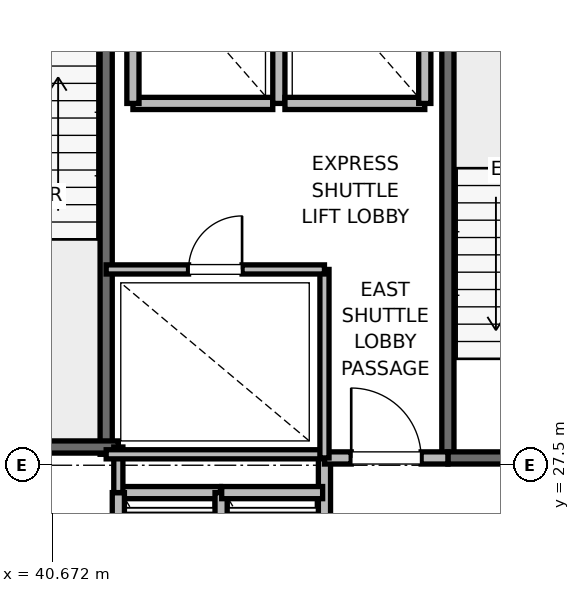
"""IFC4 building model, lengths in metres.
Left out: names, types, materials, properties, quantities, classifications, styles, units other than length and angle.
Written with IfcOpenShell. Run it as: python <this file> out.ifc"""

import sys

from ifc_helpers import new_model, si_unit, direction, frame, frame_2d, origin, place, context, subcontext, project, spatial, rectangle, extrude, element, fill, save


model = new_model("IFC4")
c1 = context("Model", 3, precision=1e-05, world=origin(), true_north=direction((0.0, 1.0)))
c2 = subcontext(c1, "Body", "Model", "MODEL_VIEW")
j1 = project(units=[si_unit("LENGTHUNIT", "METRE"), si_unit("PLANEANGLEUNIT", "RADIAN")], contexts=[c1])
p1 = place(None, origin())
s1 = spatial("IfcSite", under=j1, at=p1, CompositionType="ELEMENT")
p2 = place(p1, origin())
s2 = spatial("IfcBuilding", under=s1, at=p2, CompositionType="ELEMENT")
p3 = place(p2, frame((0.0, 0.0, 225.2)))
s3 = spatial("IfcBuildingStorey", under=s2, at=p3, CompositionType="ELEMENT", Elevation=225.2)
p4 = place(p3, frame((47.18, 27.62, 0.0), z_axis=(0.0, 0.0, 1.0), x_axis=(0.0, 1.0, 0.0)))
e1 = element("IfcWall", 1, at=p4, inside=s3, PredefinedType="SOLIDWALL", context=c2, shape_type="SweptSolid", body=[
    extrude(rectangle(XDim=8.18, YDim=0.2, at=frame_2d((4.09, 0.0))), origin(), (0.0, 0.0, 1.0), 3.775),
])
p5 = place(p3, frame((47.18, 27.62, 0.0), z_axis=(0.0, 0.0, 1.0), x_axis=(1.0, 0.0, 0.0)))
e2 = element("IfcWall", 2, at=p5, inside=s3, PredefinedType="SOLIDWALL", context=c2, shape_type="SweptSolid", body=[
    extrude(rectangle(XDim=3.12, YDim=0.2, at=frame_2d((1.56, 0.0))), origin(), (0.0, 0.0, 1.0), 3.775),
])
p6 = place(p5, frame((1.01, 0.0, 0.0)))
e3 = element("IfcOpeningElement", 3, at=p6, cuts=e2, PredefinedType="OPENING", context=c2, shape_type="SweptSolid", body=[
    extrude(rectangle(XDim=1.1, YDim=2.15, at=frame_2d((0.55, 1.075))), frame((0.0, 0.1, 0.0), z_axis=(0.0, -1.0, 0.0), x_axis=(1.0, 0.0, 0.0)), (0.0, 0.0, 1.0), 0.2),
])
p7 = place(p3, frame((41.56, 27.68, 0.0), z_axis=(0.0, 0.0, 1.0), x_axis=(0.0, 1.0, 0.0)))
e4 = element("IfcWall", 4, at=p7, inside=s3, PredefinedType="SOLIDWALL", context=c2, shape_type="SweptSolid", body=[
    extrude(rectangle(XDim=8.57, YDim=0.2, at=frame_2d((4.285, 0.0))), origin(), (0.0, 0.0, 1.0), 3.775),
])
p8 = place(p3, frame((38.44, 27.8, 0.0), z_axis=(0.0, 0.0, 1.0), x_axis=(1.0, 0.0, 0.0)))
e5 = element("IfcWall", 5, at=p8, inside=s3, PredefinedType="SOLIDWALL", context=c2, shape_type="SweptSolid", body=[
    extrude(rectangle(XDim=3.32, YDim=0.2, at=frame_2d((1.66, 0.0))), origin(), (0.0, 0.0, 1.0), 3.775),
])
p9 = place(p3, frame((45.15, 24.25, 0.0), z_axis=(0.0, 0.0, 1.0), x_axis=(0.0, 1.0, 0.0)))
e6 = element("IfcWall", 6, at=p9, inside=s3, PredefinedType="PARTITIONING", context=c2, shape_type="SweptSolid", body=[
    extrude(rectangle(XDim=3.37, YDim=0.2, at=frame_2d((1.685, 0.0))), origin(), (0.0, 0.0, 1.0), 3.775),
])
p10 = place(p3, frame((45.15, 27.62, 0.0), z_axis=(0.0, 0.0, 1.0), x_axis=(1.0, 0.0, 0.0)))
e7 = element("IfcWall", 7, at=p10, inside=s3, PredefinedType="PARTITIONING", context=c2, shape_type="SweptSolid", body=[
    extrude(rectangle(XDim=2.03, YDim=0.2, at=frame_2d((1.015, 0.0))), origin(), (0.0, 0.0, 1.0), 3.775),
])
p11 = place(p10, frame((0.44, 0.0, 0.0)))
e8 = element("IfcOpeningElement", 8, at=p11, cuts=e7, PredefinedType="OPENING", context=c2, shape_type="SweptSolid", body=[
    extrude(rectangle(XDim=1.15, YDim=2.2, at=frame_2d((0.575, 1.1))), frame((0.0, 0.1, 0.0), z_axis=(0.0, -1.0, 0.0), x_axis=(1.0, 0.0, 0.0)), (0.0, 0.0, 1.0), 0.2),
])
p12 = place(p3, frame((43.44, 27.05, 0.0), z_axis=(0.0, 0.0, 1.0), x_axis=(-1.0, 0.0, 0.0)))
e9 = element("IfcWall", 9, at=p12, inside=s3, PredefinedType="SOLIDWALL", context=c2, shape_type="SweptSolid", body=[
    extrude(rectangle(XDim=1.68, YDim=0.2, at=frame_2d((0.84, 0.0))), origin(), (0.0, 0.0, 1.0), 3.775),
])
for number, where, z_axis, x_axis in (
    (10, (41.76, 27.05, 0.0), (0.0, 0.0, 1.0), (0.0, -1.0, 0.0)),
    (11, (43.45, 24.45, 0.0), (0.0, 0.0, 1.0), (0.0, 1.0, 0.0)),
):
    element("IfcWall", number, at=place(p3, frame(where, z_axis=z_axis, x_axis=x_axis)), inside=s3, PredefinedType="SOLIDWALL", context=c2, shape_type="SweptSolid", body=[
        extrude(rectangle(XDim=2.6, YDim=0.2, at=frame_2d((1.3, 0.0))), origin(), (0.0, 0.0, 1.0), 3.775),
    ])
p13 = place(p3, frame((45.12, 27.05, 0.0), z_axis=(0.0, 0.0, 1.0), x_axis=(-1.0, 0.0, 0.0)))
e12 = element("IfcWall", 12, at=p13, inside=s3, PredefinedType="SOLIDWALL", context=c2, shape_type="SweptSolid", body=[
    extrude(rectangle(XDim=1.66, YDim=0.2, at=frame_2d((0.83, 0.0))), origin(), (0.0, 0.0, 1.0), 3.775),
])
p14 = place(p3, frame((42.0, 33.45, 0.0), z_axis=(0.0, 0.0, 1.0), x_axis=(1.0, 0.0, 0.0)))
e13 = element("IfcWall", 13, at=p14, inside=s3, PredefinedType="SOLIDWALL", context=c2, shape_type="SweptSolid", body=[
    extrude(rectangle(XDim=2.3, YDim=0.2, at=frame_2d((1.15, 0.0))), origin(), (0.0, 0.0, 1.0), 3.775),
])
for number, where, z_axis, x_axis in (
    (14, (42.0, 36.05, 0.0), (0.0, 0.0, 1.0), (0.0, -1.0, 0.0)),
    (15, (44.4, 33.45, 0.0), (0.0, 0.0, 1.0), (0.0, 1.0, 0.0)),
):
    element("IfcWall", number, at=place(p3, frame(where, z_axis=z_axis, x_axis=x_axis)), inside=s3, PredefinedType="SOLIDWALL", context=c2, shape_type="SweptSolid", body=[
        extrude(rectangle(XDim=2.6, YDim=0.2, at=frame_2d((1.3, 0.0))), origin(), (0.0, 0.0, 1.0), 2.755),
    ])
p15 = place(p3, frame((44.5, 33.45, 0.0), z_axis=(0.0, 0.0, 1.0), x_axis=(1.0, 0.0, 0.0)))
e16 = element("IfcWall", 16, at=p15, inside=s3, PredefinedType="SOLIDWALL", context=c2, shape_type="SweptSolid", body=[
    extrude(rectangle(XDim=2.3, YDim=0.2, at=frame_2d((1.15, 0.0))), origin(), (0.0, 0.0, 1.0), 3.775),
])
p16 = place(p3, frame((46.8, 33.45, 0.0), z_axis=(0.0, 0.0, 1.0), x_axis=(0.0, 1.0, 0.0)))
e17 = element("IfcWall", 17, at=p16, inside=s3, PredefinedType="SOLIDWALL", context=c2, shape_type="SweptSolid", body=[
    extrude(rectangle(XDim=2.6, YDim=0.2, at=frame_2d((1.3, 0.0))), origin(), (0.0, 0.0, 1.0), 3.775),
])
p17 = place(p3, frame((41.76, 27.05, 0.0), z_axis=(0.0, 0.0, 1.0), x_axis=(0.0, 1.0, 0.0)))
e18 = element("IfcWall", 18, at=p17, inside=s3, PredefinedType="PARTITIONING", context=c2, shape_type="SweptSolid", body=[
    extrude(rectangle(XDim=0.75, YDim=0.15, at=frame_2d((0.375, 0.0))), origin(), (0.0, 0.0, 1.0), 2.85),
])
p18 = place(p3, frame((41.56, 27.68, 0.0), z_axis=(0.0, 0.0, 1.0), x_axis=(1.0, 0.0, 0.0)))
e19 = element("IfcWall", 19, at=p18, inside=s3, PredefinedType="PARTITIONING", context=c2, shape_type="SweptSolid", body=[
    extrude(rectangle(XDim=3.59, YDim=0.15, at=frame_2d((1.795, 0.0))), origin(), (0.0, 0.0, 1.0), 2.85),
])
p19 = place(p3, frame((45.15, 27.62, 0.0), z_axis=(0.0, 0.0, 1.0), x_axis=(0.0, 1.0, 0.0)))
e20 = element("IfcWall", 20, at=p19, inside=s3, PredefinedType="PARTITIONING", context=c2, shape_type="SweptSolid", body=[
    extrude(rectangle(XDim=3.1, YDim=0.15, at=frame_2d((1.55, 0.0))), origin(), (0.0, 0.0, 1.0), 2.85),
])
p20 = place(p3, frame((41.56, 30.72, 0.0), z_axis=(0.0, 0.0, 1.0), x_axis=(1.0, 0.0, 0.0)))
e21 = element("IfcWall", 21, at=p20, inside=s3, PredefinedType="PARTITIONING", context=c2, shape_type="SweptSolid", body=[
    extrude(rectangle(XDim=3.59, YDim=0.15, at=frame_2d((1.795, 0.0))), origin(), (0.0, 0.0, 1.0), 2.85),
])
p21 = place(p20, frame((1.355, 0.0, 0.0)))
e22 = element("IfcOpeningElement", 22, at=p21, cuts=e21, PredefinedType="OPENING", context=c2, shape_type="SweptSolid", body=[
    extrude(rectangle(XDim=0.88, YDim=2.1, at=frame_2d((0.44, 1.05))), frame((0.0, 0.075, 0.0), z_axis=(0.0, -1.0, 0.0), x_axis=(1.0, 0.0, 0.0)), (0.0, 0.0, 1.0), 0.15),
])
p22 = place(p11, origin())
e23 = element("IfcDoor", 23, at=p22, inside=s3, OperationType="SINGLE_SWING_LEFT", PredefinedType="DOOR", context=c2, shape_type="SweptSolid", body=[
    extrude(rectangle(XDim=1.15, YDim=2.2, at=frame_2d((0.575, 1.1))), frame((0.0, 0.025, 0.0), z_axis=(0.0, -1.0, 0.0), x_axis=(1.0, 0.0, 0.0)), (0.0, 0.0, 1.0), 0.05),
])
fill(e8, e23)
p23 = place(p21, origin())
e24 = element("IfcDoor", 24, at=p23, inside=s3, OperationType="SINGLE_SWING_RIGHT", PredefinedType="DOOR", context=c2, shape_type="SweptSolid", body=[
    extrude(rectangle(XDim=0.88, YDim=2.1, at=frame_2d((0.44, 1.05))), frame((0.0, 0.025, 0.0), z_axis=(0.0, -1.0, 0.0), x_axis=(1.0, 0.0, 0.0)), (0.0, 0.0, 1.0), 0.05),
])
fill(e22, e24)
save(model, sys.argv[1])
